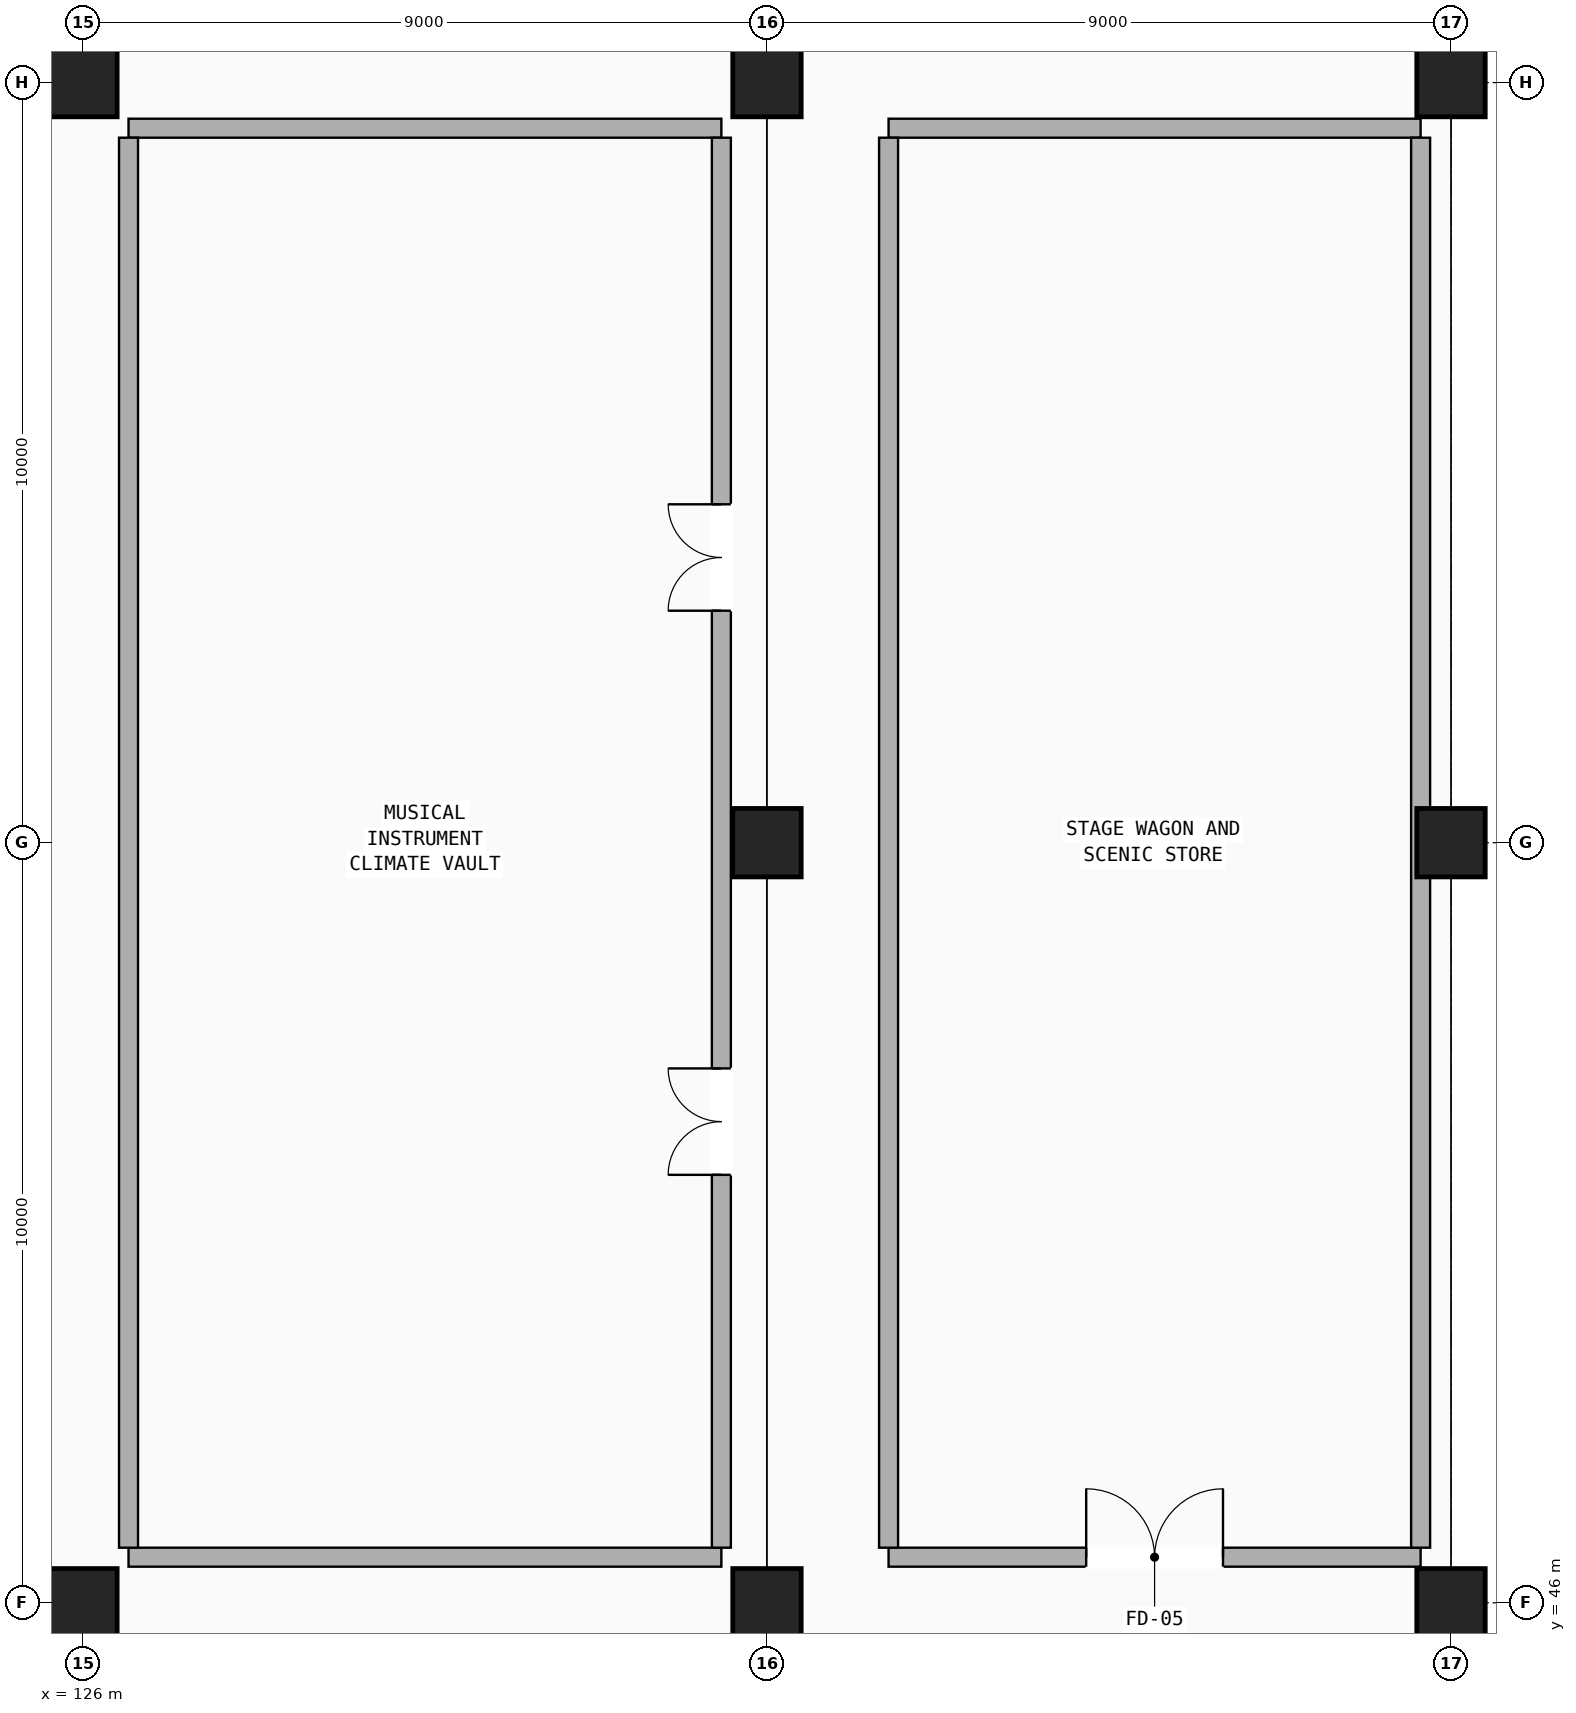
"""IFC4 building model, lengths in metres.
Left out: names, types, materials, properties, quantities, classifications, styles, units other than length and angle.
Written with IfcOpenShell. Run it as: python <this file> out.ifc"""

import sys

from ifc_helpers import new_model, si_unit, direction, frame, frame_2d, origin, origin_2d, place, context, subcontext, project, spatial, rectangle, extrude, element, fill, save


model = new_model("IFC4")
c1 = context("Model", 3, precision=1e-05, world=origin(), true_north=direction((0.0, 1.0)))
c2 = subcontext(c1, "Body", "Model", "MODEL_VIEW")
j1 = project(units=[si_unit("LENGTHUNIT", "METRE"), si_unit("PLANEANGLEUNIT", "RADIAN")], contexts=[c1])
p1 = place(None, origin())
s1 = spatial("IfcSite", under=j1, at=p1, CompositionType="ELEMENT")
p2 = place(p1, origin())
s2 = spatial("IfcBuilding", under=s1, at=p2, CompositionType="ELEMENT")
p3 = place(p2, frame((0.0, 0.0, -5.1)))
s3 = spatial("IfcBuildingStorey", under=s2, at=p3, CompositionType="ELEMENT", Elevation=-5.1)
for number, where, z_axis, x_axis in (
    (1, (126.0, 46.0, 0.0), (0.0, 0.0, 1.0), (1.0, 0.0, 0.0)),
    (2, (126.0, 66.0, 0.0), (0.0, 0.0, 1.0), (1.0, 0.0, 0.0)),
    (3, (135.0, 46.0, 0.0), (0.0, 0.0, 1.0), (1.0, 0.0, 0.0)),
    (4, (135.0, 56.0, 0.0), (0.0, 0.0, 1.0), (1.0, 0.0, 0.0)),
    (5, (135.0, 66.0, 0.0), (0.0, 0.0, 1.0), (1.0, 0.0, 0.0)),
    (6, (144.0, 46.0, 0.0), (0.0, 0.0, 1.0), (1.0, 0.0, 0.0)),
    (7, (144.0, 56.0, 0.0), (0.0, 0.0, 1.0), (1.0, 0.0, 0.0)),
    (8, (144.0, 66.0, 0.0), (0.0, 0.0, 1.0), (1.0, 0.0, 0.0)),
):
    element("IfcColumn", number, at=place(p3, frame(where, z_axis=z_axis, x_axis=x_axis)), inside=s3, PredefinedType="COLUMN", context=c2, shape_type="SweptSolid", body=[
        extrude(rectangle(XDim=0.9, YDim=0.9, at=origin_2d()), origin(), (0.0, 0.0, 1.0), 5.1),
    ])
for number, where, z_axis, x_axis in (
    (9, (126.6, 46.6, 0.0), (0.0, 0.0, 1.0), (1.0, 0.0, 0.0)),
    (10, (126.6, 65.4, 0.0), (0.0, 0.0, 1.0), (1.0, 0.0, 0.0)),
):
    element("IfcWall", number, at=place(p3, frame(where, z_axis=z_axis, x_axis=x_axis)), inside=s3, PredefinedType="PARTITIONING", context=c2, shape_type="SweptSolid", body=[
        extrude(rectangle(XDim=7.8, YDim=0.25, at=frame_2d((3.9, 0.0))), origin(), (0.0, 0.0, 1.0), 4.78),
    ])
p4 = place(p3, frame((126.6, 46.725, 0.0), z_axis=(0.0, 0.0, 1.0), x_axis=(0.0, 1.0, 0.0)))
e11 = element("IfcWall", 11, at=p4, inside=s3, PredefinedType="PARTITIONING", context=c2, shape_type="SweptSolid", body=[
    extrude(rectangle(XDim=18.55, YDim=0.25, at=frame_2d((9.275, 0.0))), origin(), (0.0, 0.0, 1.0), 4.78),
])
p5 = place(p3, frame((134.4, 46.725, 0.0), z_axis=(0.0, 0.0, 1.0), x_axis=(0.0, 1.0, 0.0)))
e12 = element("IfcWall", 12, at=p5, inside=s3, PredefinedType="PARTITIONING", context=c2, shape_type="SweptSolid", body=[
    extrude(rectangle(XDim=18.55, YDim=0.25, at=frame_2d((9.275, 0.0))), origin(), (0.0, 0.0, 1.0), 4.78),
])
p6 = place(p5, frame((4.905, 0.0, 0.0)))
e13 = element("IfcOpeningElement", 13, at=p6, cuts=e12, PredefinedType="OPENING", context=c2, shape_type="SweptSolid", body=[
    extrude(rectangle(XDim=1.4, YDim=2.2, at=frame_2d((0.7, 1.1))), frame((0.0, 0.135, 0.0), z_axis=(0.0, -1.0, 0.0), x_axis=(1.0, 0.0, 0.0)), (0.0, 0.0, 1.0), 0.27),
])
p7 = place(p5, frame((12.327, 0.0, 0.0)))
e14 = element("IfcOpeningElement", 14, at=p7, cuts=e12, PredefinedType="OPENING", context=c2, shape_type="SweptSolid", body=[
    extrude(rectangle(XDim=1.4, YDim=2.2, at=frame_2d((0.7, 1.1))), frame((0.0, 0.135, 0.0), z_axis=(0.0, -1.0, 0.0), x_axis=(1.0, 0.0, 0.0)), (0.0, 0.0, 1.0), 0.27),
])
p8 = place(p3, frame((136.6, 46.6, 0.0), z_axis=(0.0, 0.0, 1.0), x_axis=(1.0, 0.0, 0.0)))
e15 = element("IfcWall", 15, at=p8, inside=s3, PredefinedType="PARTITIONING", context=c2, shape_type="SweptSolid", body=[
    extrude(rectangle(XDim=7.0, YDim=0.25, at=frame_2d((3.5, 0.0))), origin(), (0.0, 0.0, 1.0), 4.78),
])
p9 = place(p8, frame((2.6, 0.0, 0.0)))
e16 = element("IfcOpeningElement", 16, at=p9, cuts=e15, PredefinedType="OPENING", context=c2, shape_type="SweptSolid", body=[
    extrude(rectangle(XDim=1.8, YDim=2.3, at=frame_2d((0.9, 1.15))), frame((0.0, 0.135, 0.0), z_axis=(0.0, -1.0, 0.0), x_axis=(1.0, 0.0, 0.0)), (0.0, 0.0, 1.0), 0.27),
])
p10 = place(p3, frame((136.6, 65.4, 0.0), z_axis=(0.0, 0.0, 1.0), x_axis=(1.0, 0.0, 0.0)))
e17 = element("IfcWall", 17, at=p10, inside=s3, PredefinedType="PARTITIONING", context=c2, shape_type="SweptSolid", body=[
    extrude(rectangle(XDim=7.0, YDim=0.25, at=frame_2d((3.5, 0.0))), origin(), (0.0, 0.0, 1.0), 3.91),
])
p11 = place(p3, frame((136.6, 46.725, 0.0), z_axis=(0.0, 0.0, 1.0), x_axis=(0.0, 1.0, 0.0)))
e18 = element("IfcWall", 18, at=p11, inside=s3, PredefinedType="PARTITIONING", context=c2, shape_type="SweptSolid", body=[
    extrude(rectangle(XDim=18.55, YDim=0.25, at=frame_2d((9.275, 0.0))), origin(), (0.0, 0.0, 1.0), 4.01),
])
p12 = place(p3, frame((143.6, 46.725, 0.0), z_axis=(0.0, 0.0, 1.0), x_axis=(0.0, 1.0, 0.0)))
e19 = element("IfcWall", 19, at=p12, inside=s3, PredefinedType="PARTITIONING", context=c2, shape_type="SweptSolid", body=[
    extrude(rectangle(XDim=18.55, YDim=0.25, at=frame_2d((9.275, 0.0))), origin(), (0.0, 0.0, 1.0), 3.91),
])
p13 = place(p6, origin())
e20 = element("IfcDoor", 20, at=p13, inside=s3, OperationType="DOUBLE_DOOR_SINGLE_SWING", PredefinedType="DOOR", context=c2, shape_type="SweptSolid", body=[
    extrude(rectangle(XDim=1.4, YDim=2.2, at=frame_2d((0.7, 1.1))), frame((0.0, 0.025, 0.0), z_axis=(0.0, -1.0, 0.0), x_axis=(1.0, 0.0, 0.0)), (0.0, 0.0, 1.0), 0.05),
])
fill(e13, e20)
p14 = place(p7, origin())
e21 = element("IfcDoor", 21, at=p14, inside=s3, OperationType="DOUBLE_DOOR_SINGLE_SWING", PredefinedType="DOOR", context=c2, shape_type="SweptSolid", body=[
    extrude(rectangle(XDim=1.4, YDim=2.2, at=frame_2d((0.7, 1.1))), frame((0.0, 0.025, 0.0), z_axis=(0.0, -1.0, 0.0), x_axis=(1.0, 0.0, 0.0)), (0.0, 0.0, 1.0), 0.05),
])
fill(e14, e21)
p15 = place(p9, origin())
e22 = element("IfcDoor", 22, at=p15, inside=s3, OperationType="DOUBLE_DOOR_SINGLE_SWING", PredefinedType="DOOR", context=c2, shape_type="SweptSolid", body=[
    extrude(rectangle(XDim=1.8, YDim=2.3, at=frame_2d((0.9, 1.15))), frame((0.0, 0.025, 0.0), z_axis=(0.0, -1.0, 0.0), x_axis=(1.0, 0.0, 0.0)), (0.0, 0.0, 1.0), 0.05),
])
fill(e16, e22)
save(model, sys.argv[1])
